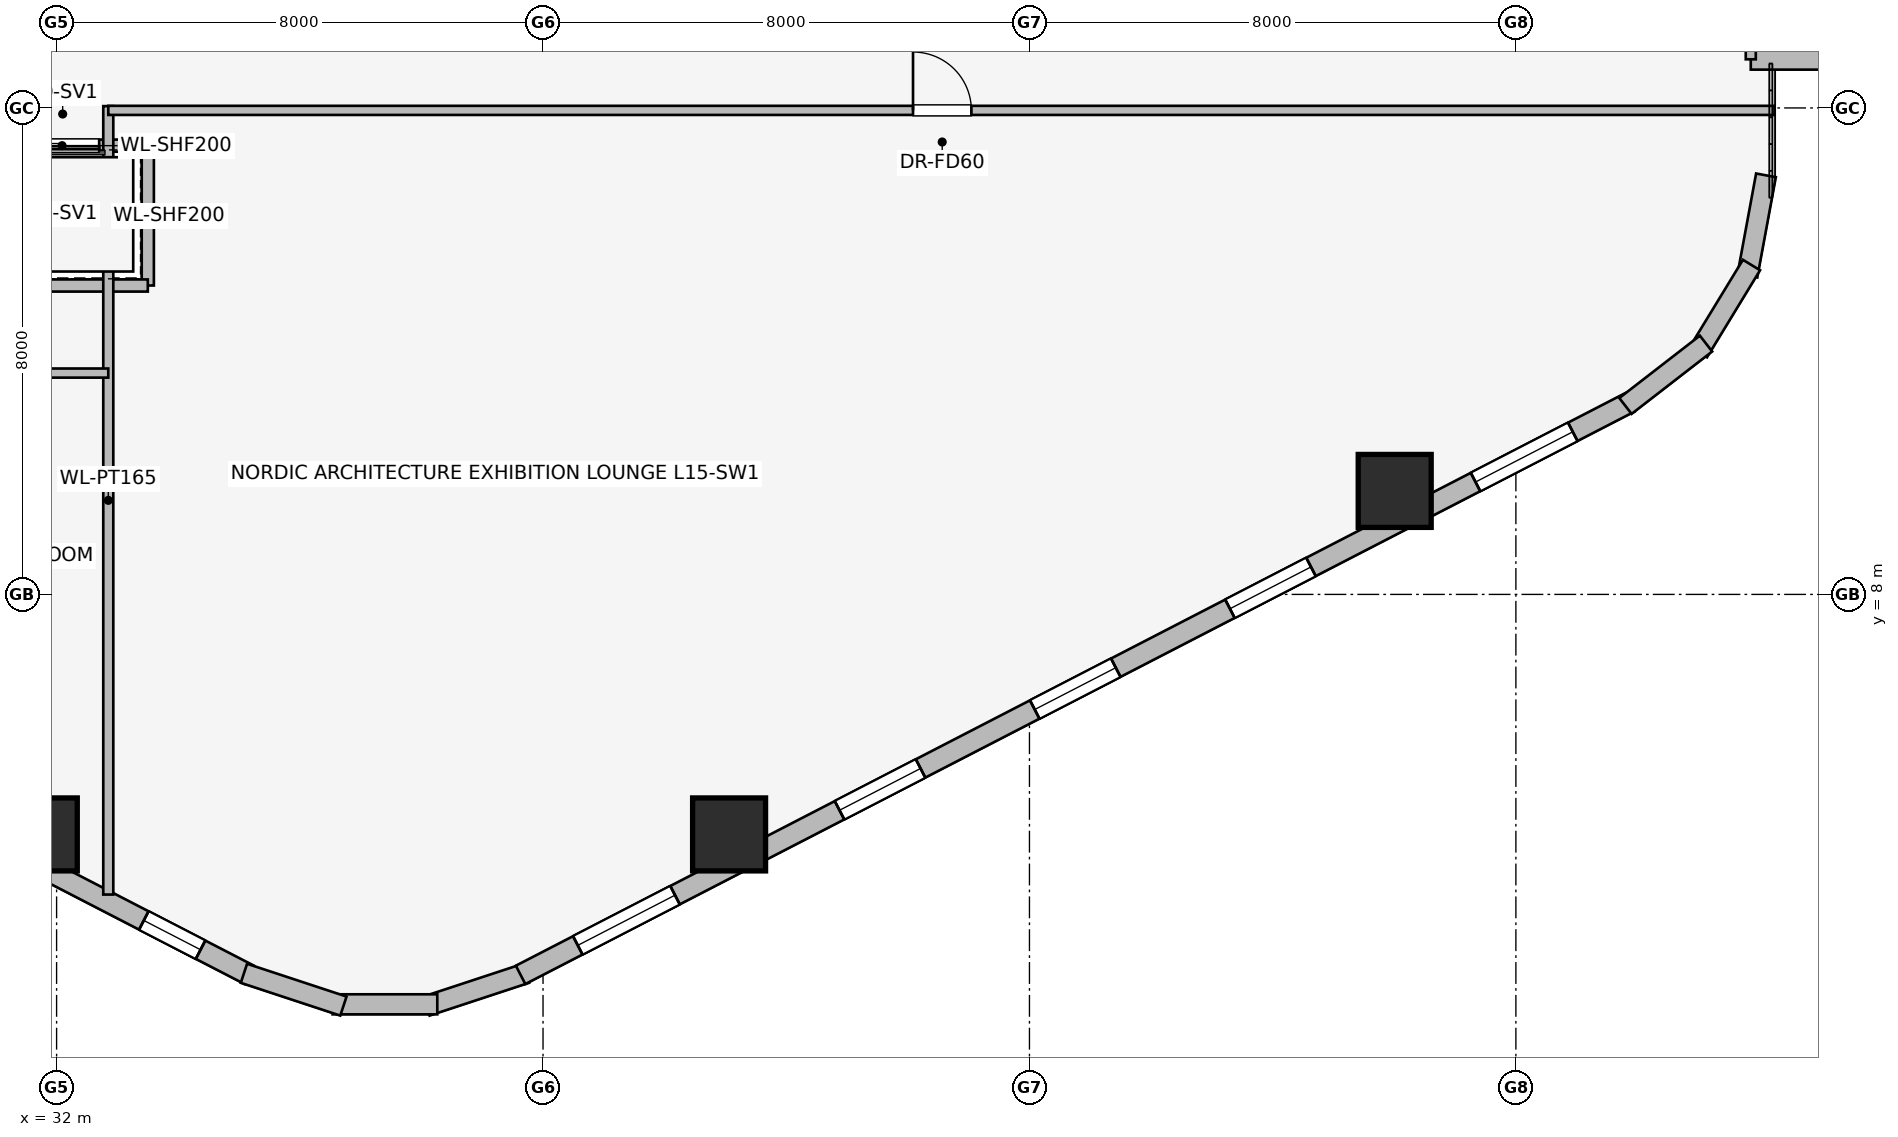
"""IFC4 building model, lengths in metres.
Left out: names, types, materials, properties, quantities, classifications, styles, units other than length and angle.
Written with IfcOpenShell. Run it as: python <this file> out.ifc"""

import sys

from ifc_helpers import new_model, si_unit, direction, frame, frame_2d, origin, origin_2d, place, context, subcontext, project, spatial, rectangle, extrude, element, fill, save


model = new_model("IFC4")
c1 = context("Model", 3, precision=1e-05, world=origin(), true_north=direction((0.0, 1.0)))
c2 = subcontext(c1, "Body", "Model", "MODEL_VIEW")
j1 = project(units=[si_unit("LENGTHUNIT", "METRE"), si_unit("PLANEANGLEUNIT", "RADIAN")], contexts=[c1])
p1 = place(None, origin())
s1 = spatial("IfcSite", under=j1, at=p1, CompositionType="ELEMENT")
p2 = place(p1, origin())
s2 = spatial("IfcBuilding", under=s1, at=p2, CompositionType="ELEMENT")
p3 = place(p2, frame((0.0, 0.0, 59.85)))
s3 = spatial("IfcBuildingStorey", under=s2, at=p3, CompositionType="ELEMENT", Elevation=59.85)
for number, where, z_axis, x_axis in (
    (1, (31.74, 4.053, 0.0), (0.0, 0.0, 1.0), (1.0, 0.0, 0.0)),
    (2, (43.06, 4.053, 0.0), (0.0, 0.0, 1.0), (1.0, 0.0, 0.0)),
    (3, (54.007, 9.702, 0.0), (0.0, 0.0, 1.0), (1.0, 0.0, 0.0)),
):
    element("IfcColumn", number, at=place(p3, frame(where, z_axis=z_axis, x_axis=x_axis)), inside=s3, PredefinedType="COLUMN", context=c2, shape_type="SweptSolid", body=[
        extrude(rectangle(XDim=1.2, YDim=1.2, at=origin_2d()), origin(), (0.0, 0.0, 1.0), 3.65),
    ])
p4 = place(p3, frame((35.169, 1.743, 0.0), z_axis=(0.0, 0.0, 1.0), x_axis=(-0.888634413993, 0.458616264721, 0.0)))
e4 = element("IfcWall", 4, at=p4, inside=s3, PredefinedType="STANDARD", context=c2, shape_type="SweptSolid", body=[
    extrude(rectangle(XDim=20.531, YDim=0.34, at=frame_2d((10.266, 0.0))), origin(), (0.0, 0.0, 1.0), 2.684),
])
p5 = place(p4, frame((0.902, 0.0, 0.75)))
e5 = element("IfcOpeningElement", 5, at=p5, cuts=e4, PredefinedType="OPENING", context=c2, shape_type="SweptSolid", body=[
    extrude(rectangle(XDim=1.05, YDim=1.4, at=frame_2d((0.525, 0.7))), frame((0.0, 0.18, 0.0), z_axis=(0.0, -1.0, 0.0), x_axis=(1.0, 0.0, 0.0)), (0.0, 0.0, 1.0), 0.36),
])
p6 = place(p4, frame((5.903, 0.0, 0.75)))
e6 = element("IfcOpeningElement", 6, at=p6, cuts=e4, PredefinedType="OPENING", context=c2, shape_type="SweptSolid", body=[
    extrude(rectangle(XDim=1.5, YDim=1.5, at=frame_2d((0.75, 0.75))), frame((0.0, 0.18, 0.0), z_axis=(0.0, -1.0, 0.0), x_axis=(1.0, 0.0, 0.0)), (0.0, 0.0, 1.0), 0.36),
])
p7 = place(p4, frame((9.516, 0.0, 0.75)))
e7 = element("IfcOpeningElement", 7, at=p7, cuts=e4, PredefinedType="OPENING", context=c2, shape_type="SweptSolid", body=[
    extrude(rectangle(XDim=1.5, YDim=1.5, at=frame_2d((0.75, 0.75))), frame((0.0, 0.18, 0.0), z_axis=(0.0, -1.0, 0.0), x_axis=(1.0, 0.0, 0.0)), (0.0, 0.0, 1.0), 0.36),
])
p8 = place(p4, frame((13.129, 0.0, 0.75)))
e8 = element("IfcOpeningElement", 8, at=p8, cuts=e4, PredefinedType="OPENING", context=c2, shape_type="SweptSolid", body=[
    extrude(rectangle(XDim=1.5, YDim=1.5, at=frame_2d((0.75, 0.75))), frame((0.0, 0.18, 0.0), z_axis=(0.0, -1.0, 0.0), x_axis=(1.0, 0.0, 0.0)), (0.0, 0.0, 1.0), 0.36),
])
p9 = place(p4, frame((17.673, 0.0, 0.75)))
e9 = element("IfcOpeningElement", 9, at=p9, cuts=e4, PredefinedType="OPENING", context=c2, shape_type="SweptSolid", body=[
    extrude(rectangle(XDim=1.8, YDim=1.5, at=frame_2d((0.9, 0.75))), frame((0.0, 0.18, 0.0), z_axis=(0.0, -1.0, 0.0), x_axis=(1.0, 0.0, 0.0)), (0.0, 0.0, 1.0), 0.36),
])
p10 = place(p3, frame((39.719, 1.769, 0.0), z_axis=(0.0, 0.0, 1.0), x_axis=(-0.94976901097, -0.312951794691, 0.0)))
e10 = element("IfcWall", 10, at=p10, inside=s3, PredefinedType="STANDARD", context=c2, shape_type="SweptSolid", body=[
    extrude(rectangle(XDim=1.722, YDim=0.33, at=frame_2d((0.861, 0.0))), origin(), (0.0, 0.0, 1.0), 3.39),
])
p11 = place(p3, frame((38.261, 1.259, 0.0), z_axis=(0.0, 0.0, 1.0), x_axis=(-1.0, 0.0, 0.0)))
e11 = element("IfcWall", 11, at=p11, inside=s3, PredefinedType="STANDARD", context=c2, shape_type="SweptSolid", body=[
    extrude(rectangle(XDim=1.722, YDim=0.33, at=frame_2d((0.861, 0.0))), origin(), (0.0, 0.0, 1.0), 3.39),
])
p12 = place(p3, frame((36.717, 1.23, 0.0), z_axis=(0.0, 0.0, 1.0), x_axis=(-0.94976901097, 0.312951794691, 0.0)))
e12 = element("IfcWall", 12, at=p12, inside=s3, PredefinedType="STANDARD", context=c2, shape_type="SweptSolid", body=[
    extrude(rectangle(XDim=1.722, YDim=0.33, at=frame_2d((0.861, 0.0))), origin(), (0.0, 0.0, 1.0), 3.39),
])
p13 = place(p3, frame((57.876, 11.159, 0.0), z_axis=(0.0, 0.0, 1.0), x_axis=(-0.888634413993, -0.458616264721, 0.0)))
e13 = element("IfcWall", 13, at=p13, inside=s3, PredefinedType="STANDARD", context=c2, shape_type="SweptSolid", body=[
    extrude(rectangle(XDim=20.531, YDim=0.34, at=frame_2d((10.266, 0.0))), origin(), (0.0, 0.0, 1.0), 2.684),
])
p14 = place(p13, frame((1.058, 0.0, 0.75)))
e14 = element("IfcOpeningElement", 14, at=p14, cuts=e13, PredefinedType="OPENING", context=c2, shape_type="SweptSolid", body=[
    extrude(rectangle(XDim=1.8, YDim=1.5, at=frame_2d((0.9, 0.75))), frame((0.0, 0.18, 0.0), z_axis=(0.0, -1.0, 0.0), x_axis=(1.0, 0.0, 0.0)), (0.0, 0.0, 1.0), 0.36),
])
p15 = place(p13, frame((5.903, 0.0, 0.75)))
e15 = element("IfcOpeningElement", 15, at=p15, cuts=e13, PredefinedType="OPENING", context=c2, shape_type="SweptSolid", body=[
    extrude(rectangle(XDim=1.5, YDim=1.5, at=frame_2d((0.75, 0.75))), frame((0.0, 0.18, 0.0), z_axis=(0.0, -1.0, 0.0), x_axis=(1.0, 0.0, 0.0)), (0.0, 0.0, 1.0), 0.36),
])
p16 = place(p13, frame((9.516, 0.0, 0.75)))
e16 = element("IfcOpeningElement", 16, at=p16, cuts=e13, PredefinedType="OPENING", context=c2, shape_type="SweptSolid", body=[
    extrude(rectangle(XDim=1.5, YDim=1.5, at=frame_2d((0.75, 0.75))), frame((0.0, 0.18, 0.0), z_axis=(0.0, -1.0, 0.0), x_axis=(1.0, 0.0, 0.0)), (0.0, 0.0, 1.0), 0.36),
])
p17 = place(p13, frame((13.129, 0.0, 0.75)))
e17 = element("IfcOpeningElement", 17, at=p17, cuts=e13, PredefinedType="OPENING", context=c2, shape_type="SweptSolid", body=[
    extrude(rectangle(XDim=1.5, YDim=1.5, at=frame_2d((0.75, 0.75))), frame((0.0, 0.18, 0.0), z_axis=(0.0, -1.0, 0.0), x_axis=(1.0, 0.0, 0.0)), (0.0, 0.0, 1.0), 0.36),
])
p18 = place(p13, frame((17.673, 0.0, 0.75)))
e18 = element("IfcOpeningElement", 18, at=p18, cuts=e13, PredefinedType="OPENING", context=c2, shape_type="SweptSolid", body=[
    extrude(rectangle(XDim=1.8, YDim=1.5, at=frame_2d((0.9, 0.75))), frame((0.0, 0.18, 0.0), z_axis=(0.0, -1.0, 0.0), x_axis=(1.0, 0.0, 0.0)), (0.0, 0.0, 1.0), 0.36),
])
p19 = place(p3, frame((60.113, 14.892, 0.0), z_axis=(0.0, 0.0, 1.0), x_axis=(-0.181714143354, -0.983351397063, 0.0)))
e19 = element("IfcWall", 19, at=p19, inside=s3, PredefinedType="STANDARD", context=c2, shape_type="SweptSolid", body=[
    extrude(rectangle(XDim=1.678, YDim=0.33, at=frame_2d((0.839, 0.0))), origin(), (0.0, 0.0, 1.0), 3.39),
])
p20 = place(p3, frame((59.875, 13.417, 0.0), z_axis=(0.0, 0.0, 1.0), x_axis=(-0.520584129191, -0.853810379671, 0.0)))
e20 = element("IfcWall", 20, at=p20, inside=s3, PredefinedType="STANDARD", context=c2, shape_type="SweptSolid", body=[
    extrude(rectangle(XDim=1.677, YDim=0.33, at=frame_2d((0.838, 0.0))), origin(), (0.0, 0.0, 1.0), 3.39),
])
p21 = place(p3, frame((59.127, 12.125, 0.0), z_axis=(0.0, 0.0, 1.0), x_axis=(-0.790691856293, -0.61221433207, 0.0)))
e21 = element("IfcWall", 21, at=p21, inside=s3, PredefinedType="STANDARD", context=c2, shape_type="SweptSolid", body=[
    extrude(rectangle(XDim=1.676, YDim=0.33, at=frame_2d((0.838, 0.0))), origin(), (0.0, 0.0, 1.0), 3.39),
])
p22 = place(p3, frame((78.863, 16.8, 0.0), z_axis=(0.0, 0.0, 1.0), x_axis=(-1.0, 0.0, 0.0)))
e22 = element("IfcWall", 22, at=p22, inside=s3, PredefinedType="STANDARD", context=c2, shape_type="SweptSolid", body=[
    extrude(rectangle(XDim=19.0, YDim=0.34, at=frame_2d((9.5, 0.0))), origin(), (0.0, 0.0, 1.0), 3.39),
])
p23 = place(p22, frame((2.633, 0.0, 0.75)))
e23 = element("IfcOpeningElement", 23, at=p23, cuts=e22, PredefinedType="OPENING", context=c2, shape_type="SweptSolid", body=[
    extrude(rectangle(XDim=1.8, YDim=1.5, at=frame_2d((0.9, 0.75))), frame((0.0, 0.18, 0.0), z_axis=(0.0, -1.0, 0.0), x_axis=(1.0, 0.0, 0.0)), (0.0, 0.0, 1.0), 0.36),
])
p24 = place(p22, frame((8.6, 0.0, 0.75)))
e24 = element("IfcOpeningElement", 24, at=p24, cuts=e22, PredefinedType="OPENING", context=c2, shape_type="SweptSolid", body=[
    extrude(rectangle(XDim=1.8, YDim=1.5, at=frame_2d((0.9, 0.75))), frame((0.0, 0.18, 0.0), z_axis=(0.0, -1.0, 0.0), x_axis=(1.0, 0.0, 0.0)), (0.0, 0.0, 1.0), 0.36),
])
p25 = place(p22, frame((14.567, 0.0, 0.75)))
e25 = element("IfcOpeningElement", 25, at=p25, cuts=e22, PredefinedType="OPENING", context=c2, shape_type="SweptSolid", body=[
    extrude(rectangle(XDim=1.8, YDim=1.5, at=frame_2d((0.9, 0.75))), frame((0.0, 0.18, 0.0), z_axis=(0.0, -1.0, 0.0), x_axis=(1.0, 0.0, 0.0)), (0.0, 0.0, 1.0), 0.36),
])
p26 = place(p3, frame((33.5, 15.38, 0.0), z_axis=(0.0, 0.0, 1.0), x_axis=(-1.0, 0.0, 0.0)))
e26 = element("IfcWall", 26, at=p26, inside=s3, PredefinedType="PARTITIONING", context=c2, shape_type="SweptSolid", body=[
    extrude(rectangle(XDim=2.82, YDim=0.2, at=frame_2d((1.41, 0.0))), origin(), (0.0, 0.0, 1.0), 3.39),
])
p27 = place(p26, frame((0.8, 0.0, 0.0)))
e27 = element("IfcOpeningElement", 27, at=p27, cuts=e26, PredefinedType="OPENING", context=c2, shape_type="SweptSolid", body=[
    extrude(rectangle(XDim=1.2, YDim=2.2, at=frame_2d((0.6, 1.1))), frame((0.0, 0.11, 0.0), z_axis=(0.0, -1.0, 0.0), x_axis=(1.0, 0.0, 0.0)), (0.0, 0.0, 1.0), 0.22),
])
p28 = place(p3, frame((33.5, 13.08, 0.0), z_axis=(0.0, 0.0, 1.0), x_axis=(0.0, 1.0, 0.0)))
e28 = element("IfcWall", 28, at=p28, inside=s3, PredefinedType="PARTITIONING", context=c2, shape_type="SweptSolid", body=[
    extrude(rectangle(XDim=2.3, YDim=0.2, at=frame_2d((1.15, 0.0))), origin(), (0.0, 0.0, 1.0), 3.39),
])
p29 = place(p3, frame((30.879, 13.08, 0.0), z_axis=(0.0, 0.0, 1.0), x_axis=(1.0, 0.0, 0.0)))
e29 = element("IfcWall", 29, at=p29, inside=s3, PredefinedType="PARTITIONING", context=c2, shape_type="SweptSolid", body=[
    extrude(rectangle(XDim=2.621, YDim=0.2, at=frame_2d((1.311, 0.0))), origin(), (0.0, 0.0, 1.0), 3.39),
])
p30 = place(p3, frame((32.85, 3.064, 0.0), z_axis=(0.0, 0.0, 1.0), x_axis=(0.0, 1.0, 0.0)))
e30 = element("IfcWall", 30, at=p30, inside=s3, PredefinedType="PARTITIONING", context=c2, shape_type="SweptSolid", body=[
    extrude(rectangle(XDim=12.966, YDim=0.165, at=frame_2d((6.483, 0.0))), origin(), (0.0, 0.0, 1.0), 3.39),
])
p31 = place(p3, frame((16.487, 11.64, 0.0), z_axis=(0.0, 0.0, 1.0), x_axis=(1.0, 0.0, 0.0)))
e31 = element("IfcWall", 31, at=p31, inside=s3, PredefinedType="PARTITIONING", context=c2, shape_type="SweptSolid", body=[
    extrude(rectangle(XDim=16.363, YDim=0.15, at=frame_2d((8.182, 0.0))), origin(), (0.0, 0.0, 1.0), 3.39),
])
p32 = place(p31, frame((6.513, 0.0, 0.0)))
e32 = element("IfcOpeningElement", 32, at=p32, cuts=e31, PredefinedType="OPENING", context=c2, shape_type="SweptSolid", body=[
    extrude(rectangle(XDim=0.9, YDim=2.0, at=frame_2d((0.45, 1.0))), frame((0.0, 0.085, 0.0), z_axis=(0.0, -1.0, 0.0), x_axis=(1.0, 0.0, 0.0)), (0.0, 0.0, 1.0), 0.17),
])
p33 = place(p3, frame((32.85, 15.96, 0.0), z_axis=(0.0, 0.0, 1.0), x_axis=(1.0, 0.0, 0.0)))
e33 = element("IfcWall", 33, at=p33, inside=s3, PredefinedType="PARTITIONING", context=c2, shape_type="SweptSolid", body=[
    extrude(rectangle(XDim=27.403, YDim=0.15, at=frame_2d((13.701, 0.0))), origin(), (0.0, 0.0, 1.0), 3.39),
])
p34 = place(p33, frame((13.235, 0.0, 0.0)))
e34 = element("IfcOpeningElement", 34, at=p34, cuts=e33, PredefinedType="OPENING", context=c2, shape_type="SweptSolid", body=[
    extrude(rectangle(XDim=0.96, YDim=2.0, at=frame_2d((0.48, 1.0))), frame((0.0, 0.085, 0.0), z_axis=(0.0, -1.0, 0.0), x_axis=(1.0, 0.0, 0.0)), (0.0, 0.0, 1.0), 0.17),
])
p35 = place(p3, frame((59.863, 16.8, 0.0), z_axis=(0.0, 0.0, 1.0), x_axis=(0.0, 1.0, 0.0)))
e35 = element("IfcWall", 35, at=p35, inside=s3, PredefinedType="PARTITIONING", context=c2, shape_type="SweptSolid", body=[
    extrude(rectangle(XDim=14.4, YDim=0.165, at=frame_2d((7.2, 0.0))), origin(), (0.0, 0.0, 1.0), 2.684),
])
p36 = place(p35, frame((2.45, 0.0, 0.0)))
e36 = element("IfcOpeningElement", 36, at=p36, cuts=e35, PredefinedType="OPENING", context=c2, shape_type="SweptSolid", body=[
    extrude(rectangle(XDim=0.96, YDim=2.0, at=frame_2d((0.48, 1.0))), frame((0.0, 0.093, 0.0), z_axis=(0.0, -1.0, 0.0), x_axis=(1.0, 0.0, 0.0)), (0.0, 0.0, 1.0), 0.185),
])
p37 = place(p5, origin())
e37 = element("IfcWindow", 37, at=p37, inside=s3, PartitioningType="SINGLE_PANEL", PredefinedType="WINDOW", context=c2, shape_type="SweptSolid", body=[
    extrude(rectangle(XDim=1.05, YDim=1.4, at=frame_2d((0.525, 0.7))), frame((0.0, 0.03, 0.0), z_axis=(0.0, -1.0, 0.0), x_axis=(1.0, 0.0, 0.0)), (0.0, 0.0, 1.0), 0.06),
])
fill(e5, e37)
p38 = place(p14, origin())
e38 = element("IfcWindow", 38, at=p38, inside=s3, PartitioningType="SINGLE_PANEL", PredefinedType="WINDOW", context=c2, shape_type="SweptSolid", body=[
    extrude(rectangle(XDim=1.8, YDim=1.5, at=frame_2d((0.9, 0.75))), frame((0.0, 0.03, 0.0), z_axis=(0.0, -1.0, 0.0), x_axis=(1.0, 0.0, 0.0)), (0.0, 0.0, 1.0), 0.06),
])
fill(e14, e38)
p39 = place(p15, origin())
e39 = element("IfcWindow", 39, at=p39, inside=s3, PartitioningType="SINGLE_PANEL", PredefinedType="WINDOW", context=c2, shape_type="SweptSolid", body=[
    extrude(rectangle(XDim=1.5, YDim=1.5, at=frame_2d((0.75, 0.75))), frame((0.0, 0.03, 0.0), z_axis=(0.0, -1.0, 0.0), x_axis=(1.0, 0.0, 0.0)), (0.0, 0.0, 1.0), 0.06),
])
fill(e15, e39)
p40 = place(p16, origin())
e40 = element("IfcWindow", 40, at=p40, inside=s3, PartitioningType="SINGLE_PANEL", PredefinedType="WINDOW", context=c2, shape_type="SweptSolid", body=[
    extrude(rectangle(XDim=1.5, YDim=1.5, at=frame_2d((0.75, 0.75))), frame((0.0, 0.03, 0.0), z_axis=(0.0, -1.0, 0.0), x_axis=(1.0, 0.0, 0.0)), (0.0, 0.0, 1.0), 0.06),
])
fill(e16, e40)
p41 = place(p17, origin())
e41 = element("IfcWindow", 41, at=p41, inside=s3, PartitioningType="SINGLE_PANEL", PredefinedType="WINDOW", context=c2, shape_type="SweptSolid", body=[
    extrude(rectangle(XDim=1.5, YDim=1.5, at=frame_2d((0.75, 0.75))), frame((0.0, 0.03, 0.0), z_axis=(0.0, -1.0, 0.0), x_axis=(1.0, 0.0, 0.0)), (0.0, 0.0, 1.0), 0.06),
])
fill(e17, e41)
p42 = place(p18, origin())
e42 = element("IfcWindow", 42, at=p42, inside=s3, PartitioningType="SINGLE_PANEL", PredefinedType="WINDOW", context=c2, shape_type="SweptSolid", body=[
    extrude(rectangle(XDim=1.8, YDim=1.5, at=frame_2d((0.9, 0.75))), frame((0.0, 0.03, 0.0), z_axis=(0.0, -1.0, 0.0), x_axis=(1.0, 0.0, 0.0)), (0.0, 0.0, 1.0), 0.06),
])
fill(e18, e42)
p43 = place(p27, origin())
e43 = element("IfcDoor", 43, at=p43, inside=s3, OperationType="SLIDING_TO_RIGHT", PredefinedType="DOOR", context=c2, shape_type="SweptSolid", body=[
    extrude(rectangle(XDim=1.2, YDim=2.2, at=frame_2d((0.6, 1.1))), frame((0.0, 0.025, 0.0), z_axis=(0.0, -1.0, 0.0), x_axis=(1.0, 0.0, 0.0)), (0.0, 0.0, 1.0), 0.05),
])
fill(e27, e43)
p44 = place(p34, origin())
e44 = element("IfcDoor", 44, at=p44, inside=s3, OperationType="SINGLE_SWING_LEFT", PredefinedType="DOOR", context=c2, shape_type="SweptSolid", body=[
    extrude(rectangle(XDim=0.96, YDim=2.0, at=frame_2d((0.48, 1.0))), frame((0.0, 0.025, 0.0), z_axis=(0.0, -1.0, 0.0), x_axis=(1.0, 0.0, 0.0)), (0.0, 0.0, 1.0), 0.05),
])
fill(e34, e44)
save(model, sys.argv[1])
